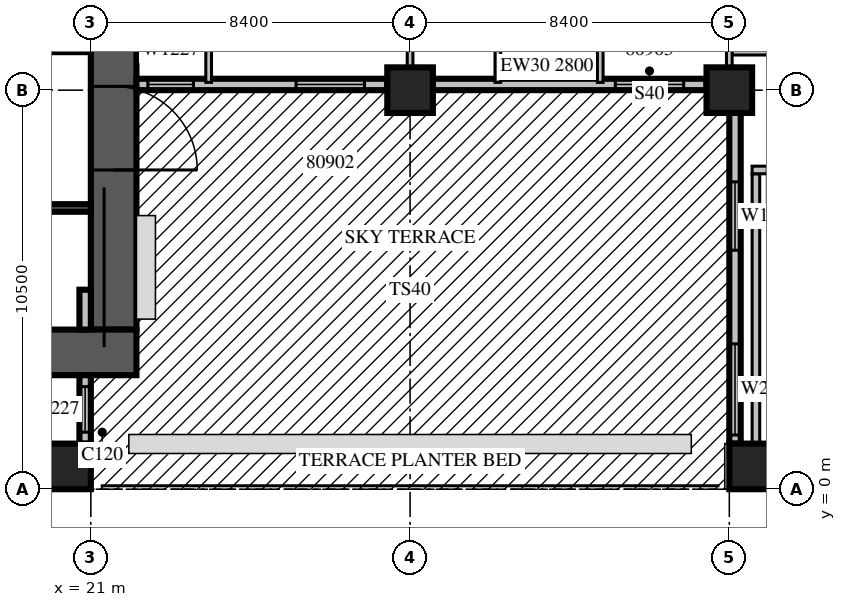
"""IFC4 building model, lengths in metres.
Left out: names, types, materials, properties, quantities, classifications, styles, units other than length and angle.
Written with IfcOpenShell. Run it as: python <this file> out.ifc"""

import sys

from ifc_helpers import new_model, si_unit, direction, frame, frame_2d, origin, origin_2d, place, context, subcontext, project, spatial, rectangle, extrude, source, transform, mapped, element, fill, save


model = new_model("IFC4")
c1 = context("Model", 3, precision=1e-05, world=origin(), true_north=direction((0.0, 1.0)))
c2 = subcontext(c1, "Body", "Model", "MODEL_VIEW")
j1 = project(units=[si_unit("LENGTHUNIT", "METRE"), si_unit("PLANEANGLEUNIT", "RADIAN")], contexts=[c1])
p1 = place(None, origin())
s1 = spatial("IfcSite", under=j1, at=p1, CompositionType="ELEMENT")
p2 = place(p1, origin())
s2 = spatial("IfcBuilding", under=s1, at=p2, CompositionType="ELEMENT")
p3 = place(p2, frame((0.0, 0.0, 48.9)))
s3 = spatial("IfcBuildingStorey", under=s2, at=p3, CompositionType="ELEMENT", Elevation=48.9)
m1 = source(origin(), c2, "Body", "SweptSolid", [
    extrude(rectangle(XDim=1.2, YDim=1.2, at=origin_2d()), origin(), (0.0, 0.0, 1.0), 4.2),
])
for number, where, z_axis, x_axis in (
    (1, (20.4, 0.6, 0.0), (0.0, 0.0, 1.0), (1.0, 0.0, 0.0)),
    (2, (38.4, 0.6, 0.0), (0.0, 0.0, 1.0), (1.0, 0.0, 0.0)),
    (3, (29.4, 10.5, 0.0), (0.0, 0.0, 1.0), (1.0, 0.0, 0.0)),
    (4, (37.8, 10.5, 0.0), (0.0, 0.0, 1.0), (1.0, 0.0, 0.0)),
):
    element("IfcColumn", number, at=place(p3, frame(where, z_axis=z_axis, x_axis=x_axis)), inside=s3, PredefinedType="COLUMN", context=c2, shape_type="MappedRepresentation", body=[
        mapped(m1, transform((0.0, 0.0, 0.0), scale=1.0)),
    ])
m2 = source(origin(), c2, "Body", "SweptSolid", [
    extrude(rectangle(XDim=16.8, YDim=1.2, at=frame_2d((8.4, 0.0))), origin(), (0.0, 0.0, 1.0), 4.2),
])
p4 = place(p3, frame((21.6, 4.2, 0.0), z_axis=(0.0, 0.0, 1.0), x_axis=(0.0, 1.0, 0.0)))
e5 = element("IfcWall", 5, at=p4, inside=s3, PredefinedType="SHEAR", context=c2, shape_type="MappedRepresentation", body=[
    mapped(m2, transform((0.0, 0.0, 0.0), scale=1.0)),
])
m3 = source(origin(), c2, "Body", "SweptSolid", [
    extrude(rectangle(XDim=2.2, YDim=2.1, at=frame_2d((1.1, 1.05))), frame((0.0, 0.61, 0.0), z_axis=(0.0, -1.0, 0.0), x_axis=(1.0, 0.0, 0.0)), (0.0, 0.0, 1.0), 1.22),
])
p5 = place(p4, frame((4.2, 0.0, 0.0)))
e6 = element("IfcOpeningElement", 6, at=p5, cuts=e5, PredefinedType="OPENING", context=c2, shape_type="MappedRepresentation", body=[
    mapped(m3, transform((0.0, 0.0, 0.0), scale=1.0)),
])
m4 = source(origin(), c2, "Body", "SweptSolid", [
    extrude(rectangle(XDim=1.2, YDim=2.1, at=frame_2d((0.6, 1.05))), frame((0.0, 0.61, 0.0), z_axis=(0.0, -1.0, 0.0), x_axis=(1.0, 0.0, 0.0)), (0.0, 0.0, 1.0), 1.22),
])
p6 = place(p4, frame((14.7, 0.0, 0.0)))
e7 = element("IfcOpeningElement", 7, at=p6, cuts=e5, PredefinedType="OPENING", context=c2, shape_type="MappedRepresentation", body=[
    mapped(m4, transform((0.0, 0.0, 0.0), scale=1.0)),
])
m5 = source(origin(), c2, "Body", "SweptSolid", [
    extrude(rectangle(XDim=18.0, YDim=1.2, at=frame_2d((9.0, 0.0))), origin(), (0.0, 0.0, 1.0), 4.2),
])
p7 = place(p3, frame((4.2, 3.6, 0.0), z_axis=(0.0, 0.0, 1.0), x_axis=(1.0, 0.0, 0.0)))
e8 = element("IfcWall", 8, at=p7, inside=s3, PredefinedType="SHEAR", context=c2, shape_type="MappedRepresentation", body=[
    mapped(m5, transform((0.0, 0.0, 0.0), scale=1.0)),
])
m6 = source(origin(), c2, "Body", "SweptSolid", [
    extrude(rectangle(XDim=1.8, YDim=0.3, at=frame_2d((0.9, 0.0))), origin(), (0.0, 0.0, 1.0), 3.8),
])
p8 = place(p3, frame((20.85, 1.2, 0.0), z_axis=(0.0, 0.0, 1.0), x_axis=(0.0, 1.0, 0.0)))
e9 = element("IfcWall", 9, at=p8, inside=s3, PredefinedType="STANDARD", context=c2, shape_type="MappedRepresentation", body=[
    mapped(m6, transform((0.0, 0.0, 0.0), scale=1.0)),
])
m7 = source(origin(), c2, "Body", "SweptSolid", [
    extrude(rectangle(XDim=1.2, YDim=2.7, at=frame_2d((0.6, 1.35))), frame((0.0, 0.16, 0.0), z_axis=(0.0, -1.0, 0.0), x_axis=(1.0, 0.0, 0.0)), (0.0, 0.0, 1.0), 0.32),
])
p9 = place(p8, frame((0.3, 0.0, 0.6)))
e10 = element("IfcOpeningElement", 10, at=p9, cuts=e9, PredefinedType="OPENING", context=c2, shape_type="MappedRepresentation", body=[
    mapped(m7, transform((0.0, 0.0, 0.0), scale=1.0)),
])
p10 = place(p3, frame((20.85, 4.2, 0.0), z_axis=(0.0, 0.0, 1.0), x_axis=(0.0, 1.0, 0.0)))
e11 = element("IfcWall", 11, at=p10, inside=s3, PredefinedType="STANDARD", context=c2, shape_type="SweptSolid", body=[
    extrude(rectangle(XDim=1.05, YDim=0.3, at=frame_2d((0.525, 0.0))), origin(), (0.0, 0.0, 1.0), 3.8),
])
m8 = source(origin(), c2, "Body", "SweptSolid", [
    extrude(rectangle(XDim=6.6, YDim=0.3, at=frame_2d((3.3, 0.0))), origin(), (0.0, 0.0, 1.0), 3.8),
])
p11 = place(p3, frame((22.2, 10.65, 0.0), z_axis=(0.0, 0.0, 1.0), x_axis=(1.0, 0.0, 0.0)))
e12 = element("IfcWall", 12, at=p11, inside=s3, PredefinedType="STANDARD", context=c2, shape_type="MappedRepresentation", body=[
    mapped(m8, transform((0.0, 0.0, 0.0), scale=1.0)),
])
p12 = place(p11, frame((0.3, 0.0, 0.6)))
e13 = element("IfcOpeningElement", 13, at=p12, cuts=e12, PredefinedType="OPENING", context=c2, shape_type="MappedRepresentation", body=[
    mapped(m7, transform((0.0, 0.0, 0.0), scale=1.0)),
])
m9 = source(origin(), c2, "Body", "SweptSolid", [
    extrude(rectangle(XDim=1.8, YDim=2.4, at=frame_2d((0.9, 1.2))), frame((0.0, 0.16, 0.0), z_axis=(0.0, -1.0, 0.0), x_axis=(1.0, 0.0, 0.0)), (0.0, 0.0, 1.0), 0.32),
])
p13 = place(p11, frame((4.2, 0.0, 0.0)))
e14 = element("IfcOpeningElement", 14, at=p13, cuts=e12, PredefinedType="OPENING", context=c2, shape_type="MappedRepresentation", body=[
    mapped(m9, transform((0.0, 0.0, 0.0), scale=1.0)),
])
p14 = place(p3, frame((30.0, 10.65, 0.0), z_axis=(0.0, 0.0, 1.0), x_axis=(1.0, 0.0, 0.0)))
e15 = element("IfcWall", 15, at=p14, inside=s3, PredefinedType="STANDARD", context=c2, shape_type="SweptSolid", body=[
    extrude(rectangle(XDim=7.2, YDim=0.3, at=frame_2d((3.6, 0.0))), origin(), (0.0, 0.0, 1.0), 2.8),
])
p15 = place(p14, frame((4.8, 0.0, 0.0)))
e16 = element("IfcOpeningElement", 16, at=p15, cuts=e15, PredefinedType="OPENING", context=c2, shape_type="MappedRepresentation", body=[
    mapped(m9, transform((0.0, 0.0, 0.0), scale=1.0)),
])
m10 = source(origin(), c2, "Body", "SweptSolid", [
    extrude(rectangle(XDim=8.7, YDim=0.3, at=frame_2d((4.35, 0.0))), origin(), (0.0, 0.0, 1.0), 3.8),
])
p16 = place(p3, frame((37.95, 9.9, 0.0), z_axis=(0.0, 0.0, 1.0), x_axis=(0.0, -1.0, 0.0)))
e17 = element("IfcWall", 17, at=p16, inside=s3, PredefinedType="STANDARD", context=c2, shape_type="MappedRepresentation", body=[
    mapped(m10, transform((0.0, 0.0, 0.0), scale=1.0)),
])
m11 = source(origin(), c2, "Body", "SweptSolid", [
    extrude(rectangle(XDim=1.8, YDim=2.7, at=frame_2d((0.9, 1.35))), frame((0.0, 0.16, 0.0), z_axis=(0.0, -1.0, 0.0), x_axis=(1.0, 0.0, 0.0)), (0.0, 0.0, 1.0), 0.32),
])
p17 = place(p16, frame((1.812, 0.0, 0.6)))
e18 = element("IfcOpeningElement", 18, at=p17, cuts=e17, PredefinedType="OPENING", context=c2, shape_type="MappedRepresentation", body=[
    mapped(m11, transform((0.0, 0.0, 0.0), scale=1.0)),
])
m12 = source(origin(), c2, "Body", "SweptSolid", [
    extrude(rectangle(XDim=2.4, YDim=2.7, at=frame_2d((1.2, 1.35))), frame((0.0, 0.16, 0.0), z_axis=(0.0, -1.0, 0.0), x_axis=(1.0, 0.0, 0.0)), (0.0, 0.0, 1.0), 0.32),
])
p18 = place(p16, frame((6.075, 0.0, 0.6)))
e19 = element("IfcOpeningElement", 19, at=p18, cuts=e17, PredefinedType="OPENING", context=c2, shape_type="MappedRepresentation", body=[
    mapped(m12, transform((0.0, 0.0, 0.0), scale=1.0)),
])
m13 = source(origin(), c2, "Body", "SweptSolid", [
    extrude(rectangle(XDim=16.8, YDim=0.2, at=frame_2d((8.4, 0.0))), origin(), (0.0, 0.0, 1.0), 4.2),
])
p19 = place(p3, frame((4.2, 7.4, 0.0), z_axis=(0.0, 0.0, 1.0), x_axis=(1.0, 0.0, 0.0)))
e20 = element("IfcWall", 20, at=p19, inside=s3, PredefinedType="SOLIDWALL", context=c2, shape_type="MappedRepresentation", body=[
    mapped(m13, transform((0.0, 0.0, 0.0), scale=1.0)),
])
m14 = source(origin(), c2, "Body", "SweptSolid", [
    extrude(rectangle(XDim=1.1, YDim=2.1, at=frame_2d((0.55, 1.05))), frame((0.0, 0.11, 0.0), z_axis=(0.0, -1.0, 0.0), x_axis=(1.0, 0.0, 0.0)), (0.0, 0.0, 1.0), 0.22),
])
p20 = place(p19, frame((0.65, 0.0, 0.0)))
e21 = element("IfcOpeningElement", 21, at=p20, cuts=e20, PredefinedType="OPENING", context=c2, shape_type="MappedRepresentation", body=[
    mapped(m14, transform((0.0, 0.0, 0.0), scale=1.0)),
])
p21 = place(p19, frame((3.05, 0.0, 0.0)))
e22 = element("IfcOpeningElement", 22, at=p21, cuts=e20, PredefinedType="OPENING", context=c2, shape_type="MappedRepresentation", body=[
    mapped(m14, transform((0.0, 0.0, 0.0), scale=1.0)),
])
p22 = place(p19, frame((5.45, 0.0, 0.0)))
e23 = element("IfcOpeningElement", 23, at=p22, cuts=e20, PredefinedType="OPENING", context=c2, shape_type="MappedRepresentation", body=[
    mapped(m14, transform((0.0, 0.0, 0.0), scale=1.0)),
])
p23 = place(p19, frame((7.85, 0.0, 0.0)))
e24 = element("IfcOpeningElement", 24, at=p23, cuts=e20, PredefinedType="OPENING", context=c2, shape_type="MappedRepresentation", body=[
    mapped(m14, transform((0.0, 0.0, 0.0), scale=1.0)),
])
m15 = source(origin(), c2, "Body", "SweptSolid", [
    extrude(rectangle(XDim=8.0, YDim=0.2, at=frame_2d((4.0, 0.0))), origin(), (0.0, 0.0, 1.0), 3.8),
])
p24 = place(p3, frame((38.5, 0.3, 0.0), z_axis=(0.0, 0.0, 1.0), x_axis=(0.0, 1.0, 0.0)))
e25 = element("IfcWall", 25, at=p24, inside=s3, PredefinedType="PARTITIONING", context=c2, shape_type="MappedRepresentation", body=[
    mapped(m15, transform((0.0, 0.0, 0.0), scale=1.0)),
])
m16 = source(origin(), c2, "Body", "SweptSolid", [
    extrude(rectangle(XDim=5.45, YDim=0.2, at=frame_2d((2.725, 0.0))), origin(), (0.0, 0.0, 1.0), 3.8),
])
p25 = place(p3, frame((38.4, 8.4, 0.0), z_axis=(0.0, 0.0, 1.0), x_axis=(1.0, 0.0, 0.0)))
e26 = element("IfcWall", 26, at=p25, inside=s3, PredefinedType="PARTITIONING", context=c2, shape_type="MappedRepresentation", body=[
    mapped(m16, transform((0.0, 0.0, 0.0), scale=1.0)),
])
m17 = source(origin(), c2, "Body", "SweptSolid", [
    extrude(rectangle(XDim=1.2, YDim=2.1, at=frame_2d((0.6, 1.05))), frame((0.0, 0.11, 0.0), z_axis=(0.0, -1.0, 0.0), x_axis=(1.0, 0.0, 0.0)), (0.0, 0.0, 1.0), 0.22),
])
p26 = place(p25, frame((0.4, 0.0, 0.0)))
e27 = element("IfcOpeningElement", 27, at=p26, cuts=e26, PredefinedType="OPENING", context=c2, shape_type="MappedRepresentation", body=[
    mapped(m17, transform((0.0, 0.0, 0.0), scale=1.0)),
])
m18 = source(origin(), c2, "Body", "SweptSolid", [
    extrude(rectangle(XDim=0.9, YDim=2.1, at=frame_2d((0.45, 1.05))), frame((0.0, 0.11, 0.0), z_axis=(0.0, -1.0, 0.0), x_axis=(1.0, 0.0, 0.0)), (0.0, 0.0, 1.0), 0.22),
])
p27 = place(p25, frame((3.25, 0.0, 0.0)))
e28 = element("IfcOpeningElement", 28, at=p27, cuts=e26, PredefinedType="OPENING", context=c2, shape_type="MappedRepresentation", body=[
    mapped(m18, transform((0.0, 0.0, 0.0), scale=1.0)),
])
p28 = place(p3, frame((24.1, 15.0, 0.0), z_axis=(0.0, 0.0, 1.0), x_axis=(0.0, -1.0, 0.0)))
e29 = element("IfcWall", 29, at=p28, inside=s3, PredefinedType="PARTITIONING", context=c2, shape_type="SweptSolid", body=[
    extrude(rectangle(XDim=4.295, YDim=0.15, at=frame_2d((2.147, 0.0))), origin(), (0.0, 0.0, 1.0), 3.8),
])
m19 = source(origin(), c2, "Body", "SweptSolid", [
    extrude(rectangle(XDim=0.9, YDim=2.1, at=frame_2d((0.45, 1.05))), frame((0.0, 0.085, 0.0), z_axis=(0.0, -1.0, 0.0), x_axis=(1.0, 0.0, 0.0)), (0.0, 0.0, 1.0), 0.17),
])
p29 = place(p28, frame((1.113, 0.0, 0.0)))
e30 = element("IfcOpeningElement", 30, at=p29, cuts=e29, PredefinedType="OPENING", context=c2, shape_type="MappedRepresentation", body=[
    mapped(m19, transform((0.0, 0.0, 0.0), scale=1.0)),
])
m20 = source(origin(), c2, "Body", "SweptSolid", [
    extrude(rectangle(XDim=3.901, YDim=0.15, at=frame_2d((1.95, 0.0))), origin(), (0.0, 0.0, 1.0), 3.8),
])
p30 = place(p3, frame((29.4, 11.099, 0.0), z_axis=(0.0, 0.0, 1.0), x_axis=(0.0, 1.0, 0.0)))
e31 = element("IfcWall", 31, at=p30, inside=s3, PredefinedType="PARTITIONING", context=c2, shape_type="MappedRepresentation", body=[
    mapped(m20, transform((0.0, 0.0, 0.0), scale=1.0)),
])
m21 = source(origin(), c2, "Body", "SweptSolid", [
    extrude(rectangle(XDim=6.45, YDim=0.15, at=frame_2d((3.225, 0.0))), origin(), (0.0, 0.0, 1.0), 3.8),
])
p31 = place(p3, frame((37.875, 11.5, 0.0), z_axis=(0.0, 0.0, 1.0), x_axis=(1.0, 0.0, 0.0)))
e32 = element("IfcWall", 32, at=p31, inside=s3, PredefinedType="PARTITIONING", context=c2, shape_type="MappedRepresentation", body=[
    mapped(m21, transform((0.0, 0.0, 0.0), scale=1.0)),
])
m22 = source(origin(), c2, "Body", "SweptSolid", [
    extrude(rectangle(XDim=4.295, YDim=0.15, at=frame_2d((2.147, 0.0))), origin(), (0.0, 0.0, 1.0), 3.8),
])
for number, where, z_axis, x_axis in (
    (33, (31.71, 10.705, 0.0), (0.0, 0.0, 1.0), (0.0, 1.0, 0.0)),
    (34, (34.403, 10.705, 0.0), (0.0, 0.0, 1.0), (0.0, 1.0, 0.0)),
):
    element("IfcWall", number, at=place(p3, frame(where, z_axis=z_axis, x_axis=x_axis)), inside=s3, PredefinedType="PARTITIONING", context=c2, shape_type="MappedRepresentation", body=[
        mapped(m22, transform((0.0, 0.0, 0.0), scale=1.0)),
    ])
p32 = place(p3, frame((37.8, 11.099, 0.0), z_axis=(0.0, 0.0, 1.0), x_axis=(0.0, 1.0, 0.0)))
e35 = element("IfcWall", 35, at=p32, inside=s3, PredefinedType="PARTITIONING", context=c2, shape_type="MappedRepresentation", body=[
    mapped(m20, transform((0.0, 0.0, 0.0), scale=1.0)),
])
m23 = source(origin(), c2, "Body", "SweptSolid", [
    extrude(rectangle(XDim=1.2, YDim=2.7, at=frame_2d((0.6, 1.35))), frame((0.0, 0.03, 0.0), z_axis=(0.0, -1.0, 0.0), x_axis=(1.0, 0.0, 0.0)), (0.0, 0.0, 1.0), 0.06),
])
p33 = place(p9, origin())
e36 = element("IfcWindow", 36, at=p33, inside=s3, PartitioningType="SINGLE_PANEL", PredefinedType="WINDOW", context=c2, shape_type="MappedRepresentation", body=[
    mapped(m23, transform((0.0, 0.0, 0.0), scale=1.0)),
])
fill(e10, e36)
p34 = place(p12, origin())
e37 = element("IfcWindow", 37, at=p34, inside=s3, PartitioningType="SINGLE_PANEL", PredefinedType="WINDOW", context=c2, shape_type="MappedRepresentation", body=[
    mapped(m23, transform((0.0, 0.0, 0.0), scale=1.0)),
])
fill(e13, e37)
m24 = source(origin(), c2, "Body", "SweptSolid", [
    extrude(rectangle(XDim=1.8, YDim=2.4, at=frame_2d((0.9, 1.2))), frame((0.0, 0.025, 0.0), z_axis=(0.0, -1.0, 0.0), x_axis=(1.0, 0.0, 0.0)), (0.0, 0.0, 1.0), 0.05),
])
p35 = place(p13, origin())
e38 = element("IfcDoor", 38, at=p35, inside=s3, OperationType="SLIDING_TO_LEFT", PredefinedType="DOOR", context=c2, shape_type="MappedRepresentation", body=[
    mapped(m24, transform((0.0, 0.0, 0.0), scale=1.0)),
])
fill(e14, e38)
p36 = place(p15, origin())
e39 = element("IfcDoor", 39, at=p36, inside=s3, OperationType="SLIDING_TO_LEFT", PredefinedType="DOOR", context=c2, shape_type="MappedRepresentation", body=[
    mapped(m24, transform((0.0, 0.0, 0.0), scale=1.0)),
])
fill(e16, e39)
m25 = source(origin(), c2, "Body", "SweptSolid", [
    extrude(rectangle(XDim=1.8, YDim=2.7, at=frame_2d((0.9, 1.35))), frame((0.0, 0.03, 0.0), z_axis=(0.0, -1.0, 0.0), x_axis=(1.0, 0.0, 0.0)), (0.0, 0.0, 1.0), 0.06),
])
p37 = place(p17, origin())
e40 = element("IfcWindow", 40, at=p37, inside=s3, PartitioningType="SINGLE_PANEL", PredefinedType="WINDOW", context=c2, shape_type="MappedRepresentation", body=[
    mapped(m25, transform((0.0, 0.0, 0.0), scale=1.0)),
])
fill(e18, e40)
m26 = source(origin(), c2, "Body", "SweptSolid", [
    extrude(rectangle(XDim=2.4, YDim=2.7, at=frame_2d((1.2, 1.35))), frame((0.0, 0.03, 0.0), z_axis=(0.0, -1.0, 0.0), x_axis=(1.0, 0.0, 0.0)), (0.0, 0.0, 1.0), 0.06),
])
p38 = place(p18, origin())
e41 = element("IfcWindow", 41, at=p38, inside=s3, PartitioningType="SINGLE_PANEL", PredefinedType="WINDOW", context=c2, shape_type="MappedRepresentation", body=[
    mapped(m26, transform((0.0, 0.0, 0.0), scale=1.0)),
])
fill(e19, e41)
m27 = source(origin(), c2, "Body", "SweptSolid", [
    extrude(rectangle(XDim=2.2, YDim=2.1, at=frame_2d((1.1, 1.05))), frame((0.0, 0.025, 0.0), z_axis=(0.0, -1.0, 0.0), x_axis=(1.0, 0.0, 0.0)), (0.0, 0.0, 1.0), 0.05),
])
p39 = place(p5, origin())
e42 = element("IfcDoor", 42, at=p39, inside=s3, OperationType="DOUBLE_DOOR_SINGLE_SWING", PredefinedType="DOOR", context=c2, shape_type="MappedRepresentation", body=[
    mapped(m27, transform((0.0, 0.0, 0.0), scale=1.0)),
])
fill(e6, e42)
save(model, sys.argv[1])
